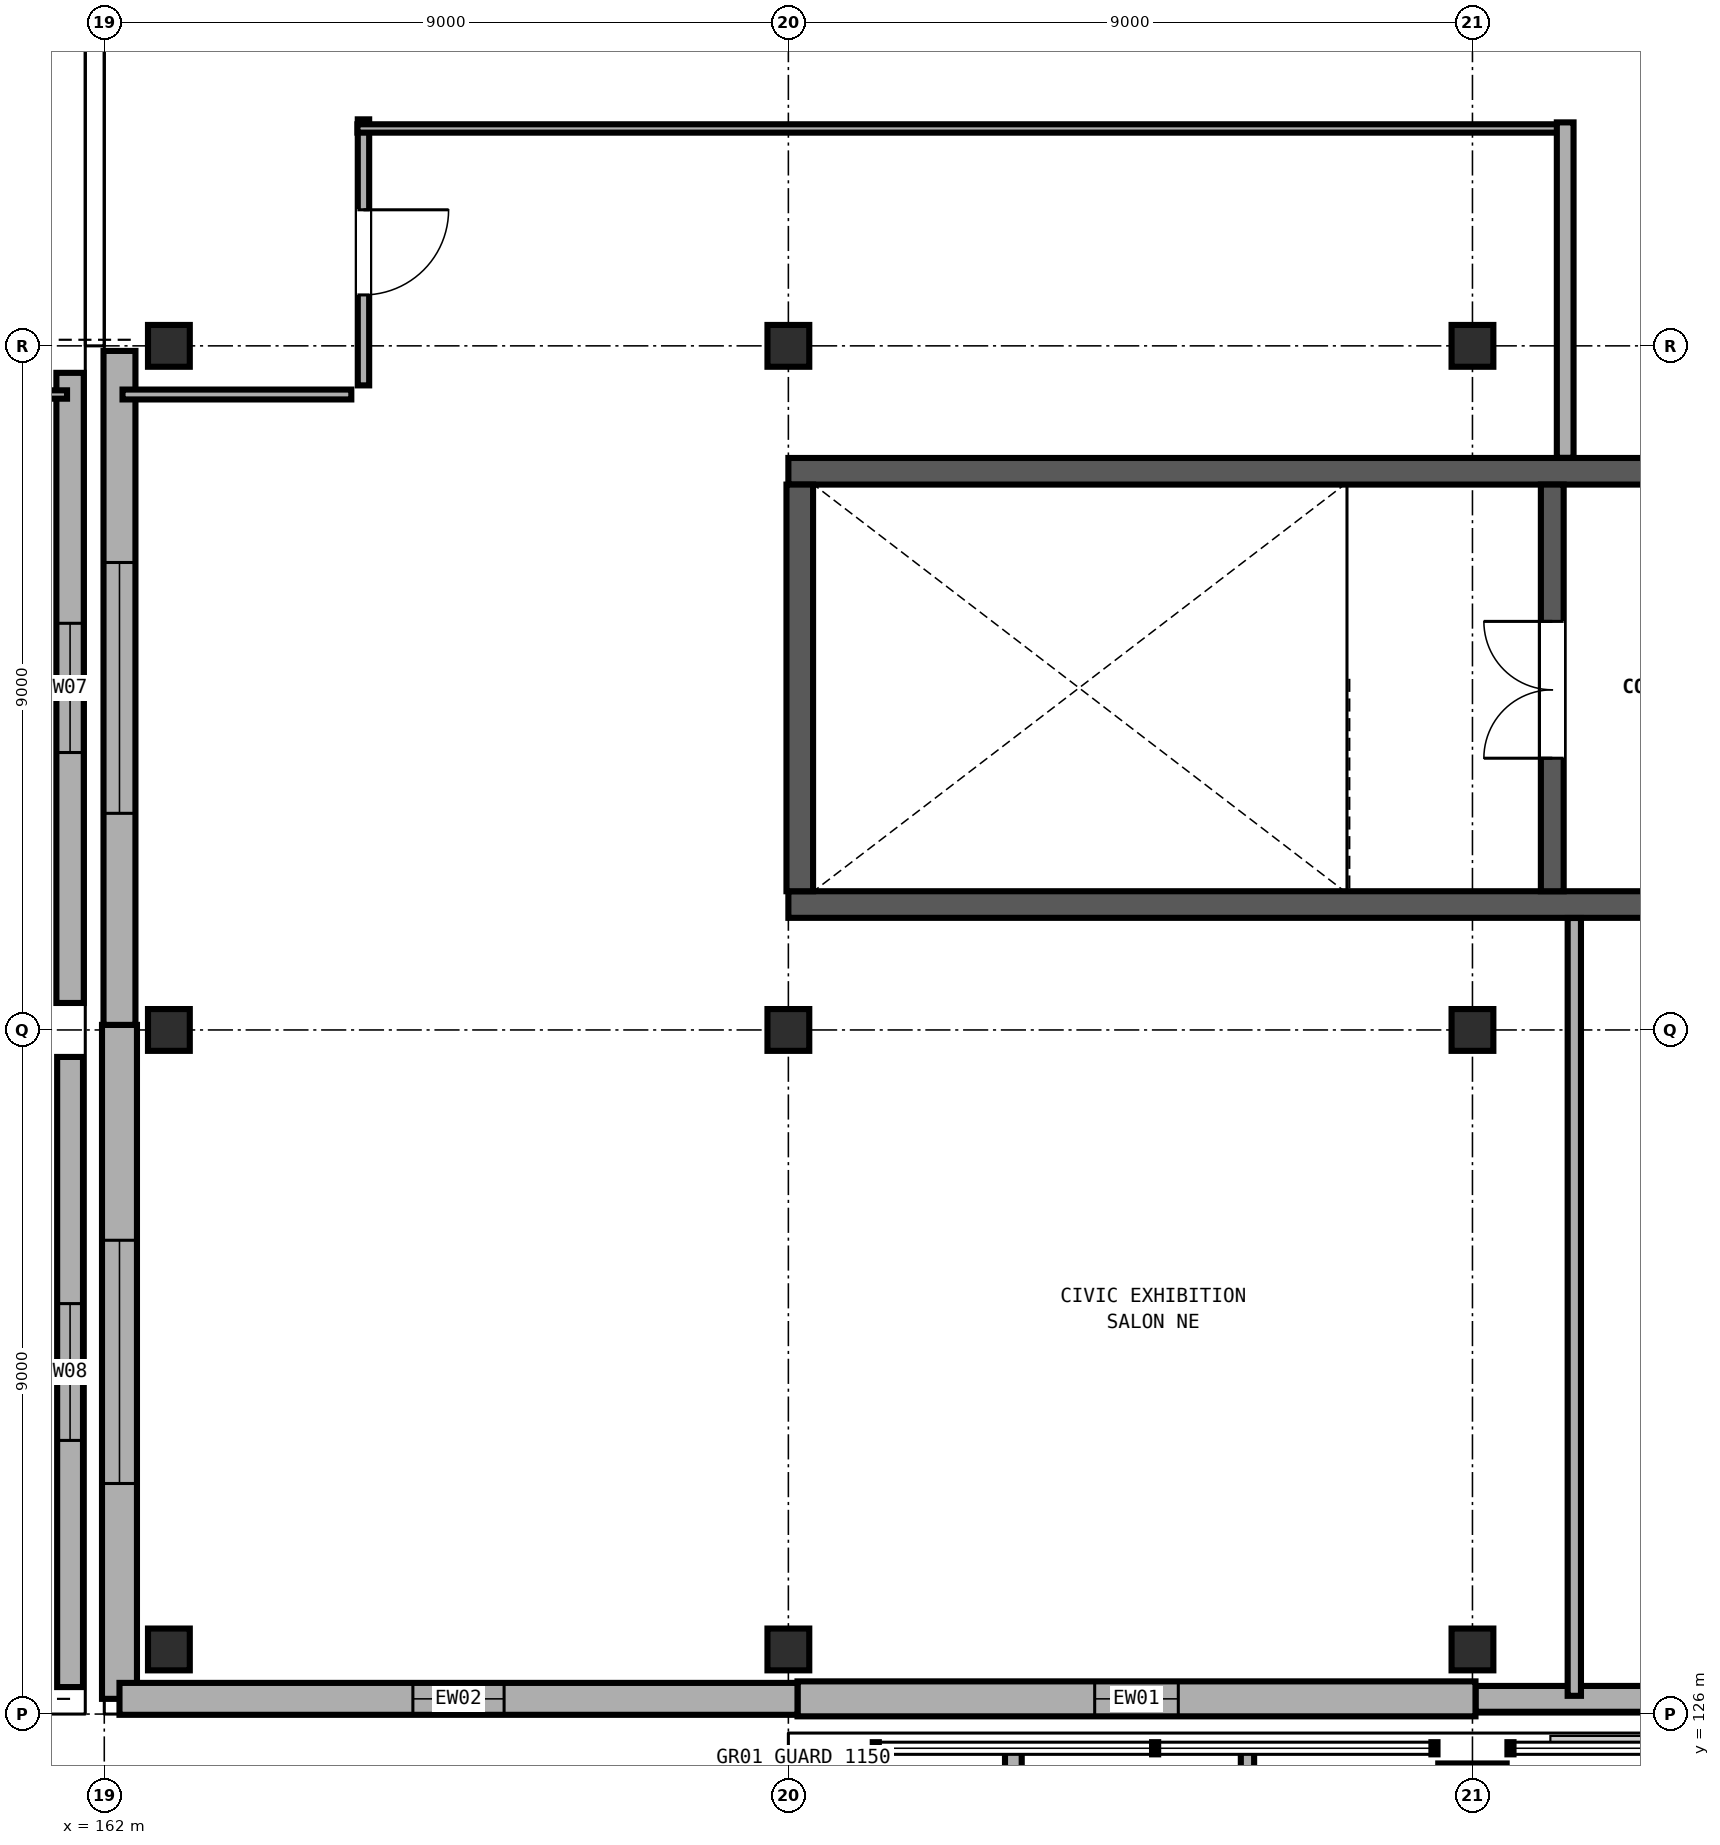
"""IFC4 building model, lengths in metres.
Left out: names, types, materials, properties, quantities, classifications, styles, units other than length and angle.
Written with IfcOpenShell. Run it as: python <this file> out.ifc"""

import sys

from ifc_helpers import new_model, si_unit, direction, frame, frame_2d, origin, origin_2d, place, context, subcontext, project, spatial, rectangle, extrude, element, fill, save


model = new_model("IFC4")
c1 = context("Model", 3, precision=1e-05, world=origin(), true_north=direction((0.0, 1.0)))
c2 = subcontext(c1, "Body", "Model", "MODEL_VIEW")
j1 = project(units=[si_unit("LENGTHUNIT", "METRE"), si_unit("PLANEANGLEUNIT", "RADIAN")], contexts=[c1])
p1 = place(None, origin())
s1 = spatial("IfcSite", under=j1, at=p1, CompositionType="ELEMENT")
p2 = place(p1, origin())
s2 = spatial("IfcBuilding", under=s1, at=p2, CompositionType="ELEMENT")
p3 = place(p2, frame((0.0, 0.0, 9.6)))
s3 = spatial("IfcBuildingStorey", under=s2, at=p3, CompositionType="ELEMENT", Elevation=9.6)
p4 = place(p3, frame((180.0, 124.9, 0.0), z_axis=(0.0, 0.0, 1.0), x_axis=(1.0, 0.0, 0.0)))
e1 = element("IfcColumn", 1, at=p4, inside=s3, PredefinedType="COLUMN", context=c2, shape_type="SweptSolid", body=[
    extrude(rectangle(XDim=0.9, YDim=0.9, at=origin_2d()), origin(), (0.0, 0.0, 1.0), 4.8),
])
for number, where, z_axis, x_axis in (
    (2, (162.85, 126.85, 0.0), (0.0, 0.0, 1.0), (1.0, 0.0, 0.0)),
    (3, (162.85, 135.0, 0.0), (0.0, 0.0, 1.0), (1.0, 0.0, 0.0)),
    (4, (162.85, 144.0, 0.0), (0.0, 0.0, 1.0), (1.0, 0.0, 0.0)),
    (5, (171.0, 126.85, 0.0), (0.0, 0.0, 1.0), (1.0, 0.0, 0.0)),
    (6, (171.0, 135.0, 0.0), (0.0, 0.0, 1.0), (1.0, 0.0, 0.0)),
    (7, (171.0, 144.0, 0.0), (0.0, 0.0, 1.0), (1.0, 0.0, 0.0)),
    (8, (180.0, 126.85, 0.0), (0.0, 0.0, 1.0), (1.0, 0.0, 0.0)),
    (9, (180.0, 135.0, 0.0), (0.0, 0.0, 1.0), (1.0, 0.0, 0.0)),
    (10, (180.0, 144.0, 0.0), (0.0, 0.0, 1.0), (1.0, 0.0, 0.0)),
):
    element("IfcColumn", number, at=place(p3, frame(where, z_axis=z_axis, x_axis=x_axis)), inside=s3, PredefinedType="COLUMN", context=c2, shape_type="SweptSolid", body=[
        extrude(rectangle(XDim=0.55, YDim=0.55, at=origin_2d()), origin(), (0.0, 0.0, 1.0), 4.8),
    ])
p5 = place(p3, frame((171.0, 136.65, 0.0), z_axis=(0.0, 0.0, 1.0), x_axis=(1.0, 0.0, 0.0)))
e11 = element("IfcWall", 11, at=p5, inside=s3, PredefinedType="SHEAR", context=c2, shape_type="SweptSolid", body=[
    extrude(rectangle(XDim=18.0, YDim=0.35, at=frame_2d((9.0, 0.0))), origin(), (0.0, 0.0, 1.0), 4.555),
])
p6 = place(p3, frame((189.0, 142.35, 0.0), z_axis=(0.0, 0.0, 1.0), x_axis=(-1.0, 0.0, 0.0)))
e12 = element("IfcWall", 12, at=p6, inside=s3, PredefinedType="SHEAR", context=c2, shape_type="SweptSolid", body=[
    extrude(rectangle(XDim=18.0, YDim=0.35, at=frame_2d((9.0, 0.0))), origin(), (0.0, 0.0, 1.0), 4.555),
])
p7 = place(p6, frame((4.7, 0.0, 0.0)))
e13 = element("IfcOpeningElement", 13, at=p7, cuts=e12, PredefinedType="OPENING", context=c2, shape_type="SweptSolid", body=[
    extrude(rectangle(XDim=1.9, YDim=2.25, at=frame_2d((0.95, 1.125))), frame((0.0, 0.185, 0.0), z_axis=(0.0, -1.0, 0.0), x_axis=(1.0, 0.0, 0.0)), (0.0, 0.0, 1.0), 0.37),
])
p8 = place(p3, frame((171.15, 142.175, 0.0), z_axis=(0.0, 0.0, 1.0), x_axis=(0.0, -1.0, 0.0)))
e14 = element("IfcWall", 14, at=p8, inside=s3, PredefinedType="SHEAR", context=c2, shape_type="SweptSolid", body=[
    extrude(rectangle(XDim=5.35, YDim=0.35, at=frame_2d((2.675, 0.0))), origin(), (0.0, 0.0, 1.0), 4.555),
])
p9 = place(p3, frame((181.05, 136.825, 0.0), z_axis=(0.0, 0.0, 1.0), x_axis=(0.0, 1.0, 0.0)))
e15 = element("IfcWall", 15, at=p9, inside=s3, PredefinedType="SHEAR", context=c2, shape_type="SweptSolid", body=[
    extrude(rectangle(XDim=5.35, YDim=0.3, at=frame_2d((2.675, 0.0))), origin(), (0.0, 0.0, 1.0), 4.555),
])
p10 = place(p9, frame((1.75, 0.0, 0.0)))
e16 = element("IfcOpeningElement", 16, at=p10, cuts=e15, PredefinedType="OPENING", context=c2, shape_type="SweptSolid", body=[
    extrude(rectangle(XDim=1.8, YDim=2.25, at=frame_2d((0.9, 1.125))), frame((0.0, 0.16, 0.0), z_axis=(0.0, -1.0, 0.0), x_axis=(1.0, 0.0, 0.0)), (0.0, 0.0, 1.0), 0.32),
])
p11 = place(p3, frame((161.55, 143.645, 0.0), z_axis=(0.0, 0.0, 1.0), x_axis=(0.0, -1.0, 0.0)))
e17 = element("IfcWall", 17, at=p11, inside=s3, PredefinedType="SOLIDWALL", context=c2, shape_type="SweptSolid", body=[
    extrude(rectangle(XDim=8.29, YDim=0.36, at=frame_2d((4.145, 0.0))), origin(), (0.0, 0.0, 1.0), 3.58),
])
p12 = place(p11, frame((3.295, 0.0, 0.9)))
e18 = element("IfcOpeningElement", 18, at=p12, cuts=e17, PredefinedType="OPENING", context=c2, shape_type="SweptSolid", body=[
    extrude(rectangle(XDim=1.7, YDim=1.7, at=frame_2d((0.85, 0.85))), frame((0.0, 0.19, 0.0), z_axis=(0.0, -1.0, 0.0), x_axis=(1.0, 0.0, 0.0)), (0.0, 0.0, 1.0), 0.38),
])
p13 = place(p3, frame((161.55, 134.645, 0.0), z_axis=(0.0, 0.0, 1.0), x_axis=(0.0, -1.0, 0.0)))
e19 = element("IfcWall", 19, at=p13, inside=s3, PredefinedType="SOLIDWALL", context=c2, shape_type="SweptSolid", body=[
    extrude(rectangle(XDim=8.29, YDim=0.34, at=frame_2d((4.145, 0.0))), origin(), (0.0, 0.0, 1.0), 3.58),
])
p14 = place(p13, frame((3.245, 0.0, 0.9)))
e20 = element("IfcOpeningElement", 20, at=p14, cuts=e19, PredefinedType="OPENING", context=c2, shape_type="SweptSolid", body=[
    extrude(rectangle(XDim=1.8, YDim=1.75, at=frame_2d((0.9, 0.875))), frame((0.0, 0.18, 0.0), z_axis=(0.0, -1.0, 0.0), x_axis=(1.0, 0.0, 0.0)), (0.0, 0.0, 1.0), 0.36),
])
p15 = place(p3, frame((162.2, 126.2, 0.0), z_axis=(0.0, 0.0, 1.0), x_axis=(0.0, 1.0, 0.0)))
e21 = element("IfcWall", 21, at=p15, inside=s3, PredefinedType="SOLIDWALL", context=c2, shape_type="SweptSolid", body=[
    extrude(rectangle(XDim=8.867, YDim=0.46, at=frame_2d((4.433, 0.0))), origin(), (0.0, 0.0, 1.0), 3.58),
])
p16 = place(p15, frame((2.833, 0.0, 0.9)))
e22 = element("IfcOpeningElement", 22, at=p16, cuts=e21, PredefinedType="OPENING", context=c2, shape_type="SweptSolid", body=[
    extrude(rectangle(XDim=3.2, YDim=2.05, at=frame_2d((1.6, 1.025))), frame((0.0, 0.24, 0.0), z_axis=(0.0, -1.0, 0.0), x_axis=(1.0, 0.0, 0.0)), (0.0, 0.0, 1.0), 0.48),
])
p17 = place(p3, frame((162.2, 135.067, 0.0), z_axis=(0.0, 0.0, 1.0), x_axis=(0.0, 1.0, 0.0)))
e23 = element("IfcWall", 23, at=p17, inside=s3, PredefinedType="SOLIDWALL", context=c2, shape_type="SweptSolid", body=[
    extrude(rectangle(XDim=8.867, YDim=0.42, at=frame_2d((4.433, 0.0))), origin(), (0.0, 0.0, 1.0), 3.58),
])
p18 = place(p17, frame((2.783, 0.0, 0.9)))
e24 = element("IfcOpeningElement", 24, at=p18, cuts=e23, PredefinedType="OPENING", context=c2, shape_type="SweptSolid", body=[
    extrude(rectangle(XDim=3.3, YDim=2.0, at=frame_2d((1.65, 1.0))), frame((0.0, 0.22, 0.0), z_axis=(0.0, -1.0, 0.0), x_axis=(1.0, 0.0, 0.0)), (0.0, 0.0, 1.0), 0.44),
])
p19 = place(p3, frame((188.96, 126.2, 0.0), z_axis=(0.0, 0.0, 1.0), x_axis=(-1.0, 0.0, 0.0)))
e25 = element("IfcWall", 25, at=p19, inside=s3, PredefinedType="SOLIDWALL", context=c2, shape_type="SweptSolid", body=[
    extrude(rectangle(XDim=8.92, YDim=0.34, at=frame_2d((4.46, 0.0))), origin(), (0.0, 0.0, 1.0), 3.58),
])
p20 = place(p19, frame((3.335, 0.0, 0.9)))
e26 = element("IfcOpeningElement", 26, at=p20, cuts=e25, PredefinedType="OPENING", context=c2, shape_type="SweptSolid", body=[
    extrude(rectangle(XDim=2.25, YDim=2.05, at=frame_2d((1.125, 1.025))), frame((0.0, 0.18, 0.0), z_axis=(0.0, -1.0, 0.0), x_axis=(1.0, 0.0, 0.0)), (0.0, 0.0, 1.0), 0.36),
])
p21 = place(p3, frame((180.04, 126.2, 0.0), z_axis=(0.0, 0.0, 1.0), x_axis=(-1.0, 0.0, 0.0)))
e27 = element("IfcWall", 27, at=p21, inside=s3, PredefinedType="SOLIDWALL", context=c2, shape_type="SweptSolid", body=[
    extrude(rectangle(XDim=8.92, YDim=0.46, at=frame_2d((4.46, 0.0))), origin(), (0.0, 0.0, 1.0), 3.58),
])
p22 = place(p21, frame((3.91, 0.0, 0.9)))
e28 = element("IfcOpeningElement", 28, at=p22, cuts=e27, PredefinedType="OPENING", context=c2, shape_type="SweptSolid", body=[
    extrude(rectangle(XDim=1.1, YDim=1.4, at=frame_2d((0.55, 0.7))), frame((0.0, 0.24, 0.0), z_axis=(0.0, -1.0, 0.0), x_axis=(1.0, 0.0, 0.0)), (0.0, 0.0, 1.0), 0.48),
])
p23 = place(p3, frame((171.12, 126.2, 0.0), z_axis=(0.0, 0.0, 1.0), x_axis=(-1.0, 0.0, 0.0)))
e29 = element("IfcWall", 29, at=p23, inside=s3, PredefinedType="SOLIDWALL", context=c2, shape_type="SweptSolid", body=[
    extrude(rectangle(XDim=8.92, YDim=0.42, at=frame_2d((4.46, 0.0))), origin(), (0.0, 0.0, 1.0), 3.58),
])
p24 = place(p23, frame((3.86, 0.0, 0.9)))
e30 = element("IfcOpeningElement", 30, at=p24, cuts=e29, PredefinedType="OPENING", context=c2, shape_type="SweptSolid", body=[
    extrude(rectangle(XDim=1.2, YDim=1.45, at=frame_2d((0.6, 0.725))), frame((0.0, 0.22, 0.0), z_axis=(0.0, -1.0, 0.0), x_axis=(1.0, 0.0, 0.0)), (0.0, 0.0, 1.0), 0.44),
])
p25 = place(p3, frame((177.04, 125.55, 0.0), z_axis=(0.0, 0.0, 1.0), x_axis=(0.0, -1.0, 0.0)))
e31 = element("IfcWall", 31, at=p25, inside=s3, PredefinedType="PARTITIONING", context=c2, shape_type="SweptSolid", body=[
    extrude(rectangle(XDim=22.78, YDim=0.175, at=frame_2d((11.39, 0.0))), origin(), (0.0, 0.0, 1.0), 3.56),
])
p26 = place(p25, frame((12.042, 0.0, 0.0)))
e32 = element("IfcOpeningElement", 32, at=p26, cuts=e31, PredefinedType="OPENING", context=c2, shape_type="SweptSolid", body=[
    extrude(rectangle(XDim=1.4, YDim=2.15, at=frame_2d((0.7, 1.075))), frame((0.0, 0.097, 0.0), z_axis=(0.0, -1.0, 0.0), x_axis=(1.0, 0.0, 0.0)), (0.0, 0.0, 1.0), 0.195),
])
p27 = place(p3, frame((173.96, 107.658, 0.0), z_axis=(0.0, 0.0, 1.0), x_axis=(0.0, 1.0, 0.0)))
e33 = element("IfcWall", 33, at=p27, inside=s3, PredefinedType="PARTITIONING", context=c2, shape_type="SweptSolid", body=[
    extrude(rectangle(XDim=17.892, YDim=0.22, at=frame_2d((8.946, 0.0))), origin(), (0.0, 0.0, 1.0), 3.56),
])
p28 = place(p27, frame((5.144, 0.0, 0.0)))
e34 = element("IfcOpeningElement", 34, at=p28, cuts=e33, PredefinedType="OPENING", context=c2, shape_type="SweptSolid", body=[
    extrude(rectangle(XDim=1.25, YDim=2.15, at=frame_2d((0.625, 1.075))), frame((0.0, 0.12, 0.0), z_axis=(0.0, -1.0, 0.0), x_axis=(1.0, 0.0, 0.0)), (0.0, 0.0, 1.0), 0.24),
])
p29 = place(p3, frame((158.15, 143.36, 0.0), z_axis=(0.0, 0.0, 1.0), x_axis=(1.0, 0.0, 0.0)))
e35 = element("IfcWall", 35, at=p29, inside=s3, PredefinedType="PARTITIONING", context=c2, shape_type="SweptSolid", body=[
    extrude(rectangle(XDim=3.36, YDim=0.11, at=frame_2d((1.68, 0.0))), origin(), (0.0, 0.0, 1.0), 3.56),
])
p30 = place(p3, frame((181.34, 126.24, 0.0), z_axis=(0.0, 0.0, 1.0), x_axis=(0.0, 1.0, 0.0)))
e36 = element("IfcWall", 36, at=p30, inside=s3, PredefinedType="PARTITIONING", context=c2, shape_type="SweptSolid", body=[
    extrude(rectangle(XDim=10.233, YDim=0.175, at=frame_2d((5.116, 0.0))), origin(), (0.0, 0.0, 1.0), 3.56),
])
p31 = place(p3, frame((165.41, 146.98, 0.0), z_axis=(0.0, 0.0, 1.0), x_axis=(0.0, -1.0, 0.0)))
e37 = element("IfcWall", 37, at=p31, inside=s3, PredefinedType="PARTITIONING", context=c2, shape_type="SweptSolid", body=[
    extrude(rectangle(XDim=3.5, YDim=0.15, at=frame_2d((1.75, 0.0))), origin(), (0.0, 0.0, 1.0), 3.56),
])
p32 = place(p31, frame((1.19, 0.0, 0.0)))
e38 = element("IfcOpeningElement", 38, at=p32, cuts=e37, PredefinedType="OPENING", context=c2, shape_type="SweptSolid", body=[
    extrude(rectangle(XDim=1.12, YDim=2.22, at=frame_2d((0.56, 1.11))), frame((0.0, 0.085, 0.0), z_axis=(0.0, -1.0, 0.0), x_axis=(1.0, 0.0, 0.0)), (0.0, 0.0, 1.0), 0.17),
])
p33 = place(p3, frame((162.24, 143.36, 0.0), z_axis=(0.0, 0.0, 1.0), x_axis=(1.0, 0.0, 0.0)))
e39 = element("IfcWall", 39, at=p33, inside=s3, PredefinedType="PARTITIONING", context=c2, shape_type="SweptSolid", body=[
    extrude(rectangle(XDim=3.01, YDim=0.13, at=frame_2d((1.505, 0.0))), origin(), (0.0, 0.0, 1.0), 3.56),
])
p34 = place(p3, frame((165.33, 146.86, 0.0), z_axis=(0.0, 0.0, 1.0), x_axis=(1.0, 0.0, 0.0)))
e40 = element("IfcWall", 40, at=p34, inside=s3, PredefinedType="PARTITIONING", context=c2, shape_type="SweptSolid", body=[
    extrude(rectangle(XDim=15.97, YDim=0.11, at=frame_2d((7.985, 0.0))), origin(), (0.0, 0.0, 1.0), 3.56),
])
p35 = place(p3, frame((181.22, 146.94, 0.0), z_axis=(0.0, 0.0, 1.0), x_axis=(0.0, -1.0, 0.0)))
e41 = element("IfcWall", 41, at=p35, inside=s3, PredefinedType="PARTITIONING", context=c2, shape_type="SweptSolid", body=[
    extrude(rectangle(XDim=4.413, YDim=0.22, at=frame_2d((2.207, 0.0))), origin(), (0.0, 0.0, 1.0), 3.56),
])
p36 = place(p12, origin())
e42 = element("IfcWindow", 42, at=p36, inside=s3, PartitioningType="SINGLE_PANEL", PredefinedType="WINDOW", context=c2, shape_type="SweptSolid", body=[
    extrude(rectangle(XDim=1.7, YDim=1.7, at=frame_2d((0.85, 0.85))), frame((0.0, 0.03, 0.0), z_axis=(0.0, -1.0, 0.0), x_axis=(1.0, 0.0, 0.0)), (0.0, 0.0, 1.0), 0.06),
])
fill(e18, e42)
p37 = place(p14, origin())
e43 = element("IfcWindow", 43, at=p37, inside=s3, PartitioningType="DOUBLE_PANEL_VERTICAL", PredefinedType="WINDOW", context=c2, shape_type="SweptSolid", body=[
    extrude(rectangle(XDim=1.8, YDim=1.75, at=frame_2d((0.9, 0.875))), frame((0.0, 0.03, 0.0), z_axis=(0.0, -1.0, 0.0), x_axis=(1.0, 0.0, 0.0)), (0.0, 0.0, 1.0), 0.06),
])
fill(e20, e43)
p38 = place(p16, origin())
e44 = element("IfcWindow", 44, at=p38, inside=s3, PartitioningType="DOUBLE_PANEL_VERTICAL", PredefinedType="WINDOW", context=c2, shape_type="SweptSolid", body=[
    extrude(rectangle(XDim=3.2, YDim=2.05, at=frame_2d((1.6, 1.025))), frame((0.0, 0.03, 0.0), z_axis=(0.0, -1.0, 0.0), x_axis=(1.0, 0.0, 0.0)), (0.0, 0.0, 1.0), 0.06),
])
fill(e22, e44)
p39 = place(p18, origin())
e45 = element("IfcWindow", 45, at=p39, inside=s3, PartitioningType="DOUBLE_PANEL_VERTICAL", PredefinedType="WINDOW", context=c2, shape_type="SweptSolid", body=[
    extrude(rectangle(XDim=3.3, YDim=2.0, at=frame_2d((1.65, 1.0))), frame((0.0, 0.03, 0.0), z_axis=(0.0, -1.0, 0.0), x_axis=(1.0, 0.0, 0.0)), (0.0, 0.0, 1.0), 0.06),
])
fill(e24, e45)
p40 = place(p22, origin())
e46 = element("IfcWindow", 46, at=p40, inside=s3, PartitioningType="SINGLE_PANEL", PredefinedType="WINDOW", context=c2, shape_type="SweptSolid", body=[
    extrude(rectangle(XDim=1.1, YDim=1.4, at=frame_2d((0.55, 0.7))), frame((0.0, 0.03, 0.0), z_axis=(0.0, -1.0, 0.0), x_axis=(1.0, 0.0, 0.0)), (0.0, 0.0, 1.0), 0.06),
])
fill(e28, e46)
p41 = place(p24, origin())
e47 = element("IfcWindow", 47, at=p41, inside=s3, PartitioningType="SINGLE_PANEL", PredefinedType="WINDOW", context=c2, shape_type="SweptSolid", body=[
    extrude(rectangle(XDim=1.2, YDim=1.45, at=frame_2d((0.6, 0.725))), frame((0.0, 0.03, 0.0), z_axis=(0.0, -1.0, 0.0), x_axis=(1.0, 0.0, 0.0)), (0.0, 0.0, 1.0), 0.06),
])
fill(e30, e47)
p42 = place(p10, origin())
e48 = element("IfcDoor", 48, at=p42, inside=s3, OperationType="DOUBLE_DOOR_SINGLE_SWING", PredefinedType="DOOR", context=c2, shape_type="SweptSolid", body=[
    extrude(rectangle(XDim=1.8, YDim=2.25, at=frame_2d((0.9, 1.125))), frame((0.0, 0.025, 0.0), z_axis=(0.0, -1.0, 0.0), x_axis=(1.0, 0.0, 0.0)), (0.0, 0.0, 1.0), 0.05),
])
fill(e16, e48)
p43 = place(p32, origin())
e49 = element("IfcDoor", 49, at=p43, inside=s3, OperationType="SINGLE_SWING_LEFT", PredefinedType="DOOR", context=c2, shape_type="SweptSolid", body=[
    extrude(rectangle(XDim=1.12, YDim=2.22, at=frame_2d((0.56, 1.11))), frame((0.0, 0.025, 0.0), z_axis=(0.0, -1.0, 0.0), x_axis=(1.0, 0.0, 0.0)), (0.0, 0.0, 1.0), 0.05),
])
fill(e38, e49)
save(model, sys.argv[1])
